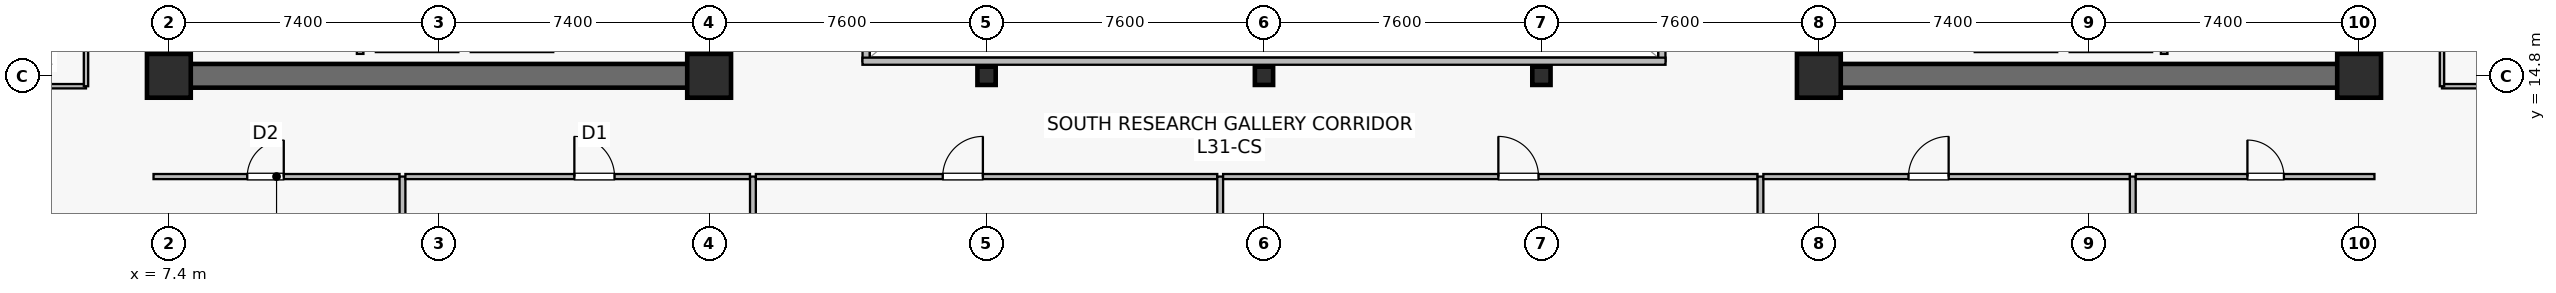
"""IFC4 building model, lengths in metres.
Left out: names, types, materials, properties, quantities, classifications, styles, units other than length and angle.
Written with IfcOpenShell. Run it as: python <this file> out.ifc"""

import sys

from ifc_helpers import new_model, si_unit, direction, frame, frame_2d, origin, origin_2d, place, context, subcontext, project, spatial, rectangle, hollow_rectangle, extrude, source, transform, mapped, element, fill, save


model = new_model("IFC4")
c1 = context("Model", 3, precision=1e-05, world=origin(), true_north=direction((0.0, 1.0)))
c2 = subcontext(c1, "Body", "Model", "MODEL_VIEW")
j1 = project(units=[si_unit("LENGTHUNIT", "METRE"), si_unit("PLANEANGLEUNIT", "RADIAN")], contexts=[c1])
p1 = place(None, origin())
s1 = spatial("IfcSite", under=j1, at=p1, CompositionType="ELEMENT")
p2 = place(p1, origin())
s2 = spatial("IfcBuilding", under=s1, at=p2, CompositionType="ELEMENT")
p3 = place(p2, frame((0.0, 0.0, 129.7)))
s3 = spatial("IfcBuildingStorey", under=s2, at=p3, CompositionType="ELEMENT", Elevation=129.7)
p4 = place(p3, frame((7.075, 14.8, 0.0), z_axis=(0.0, 0.0, 1.0), x_axis=(1.0, 0.0, 0.0)))
e1 = element("IfcWall", 1, at=p4, inside=s3, PredefinedType="SHEAR", context=c2, shape_type="SweptSolid", body=[
    extrude(rectangle(XDim=15.45, YDim=0.65, at=frame_2d((7.725, 0.0))), origin(), (0.0, 0.0, 1.0), 3.79),
])
p5 = place(p3, frame((7.4, 15.125, 0.0), z_axis=(0.0, 0.0, 1.0), x_axis=(0.0, 1.0, 0.0)))
e2 = element("IfcWall", 2, at=p5, inside=s3, PredefinedType="SHEAR", context=c2, shape_type="SweptSolid", body=[
    extrude(rectangle(XDim=18.35, YDim=0.65, at=frame_2d((9.175, 0.0))), origin(), (0.0, 0.0, 1.0), 3.79),
])
p6 = place(p3, frame((22.2, 15.125, 0.0), z_axis=(0.0, 0.0, 1.0), x_axis=(0.0, 1.0, 0.0)))
e3 = element("IfcWall", 3, at=p6, inside=s3, PredefinedType="SHEAR", context=c2, shape_type="SweptSolid", body=[
    extrude(rectangle(XDim=18.35, YDim=0.65, at=frame_2d((9.175, 0.0))), origin(), (0.0, 0.0, 1.0), 3.79),
])
p7 = place(p6, frame((3.425, 0.0, 0.0)))
e4 = element("IfcOpeningElement", 4, at=p7, cuts=e3, PredefinedType="OPENING", context=c2, shape_type="SweptSolid", body=[
    extrude(rectangle(XDim=1.42, YDim=2.2, at=frame_2d((0.71, 1.1))), frame((0.0, 0.335, 0.0), z_axis=(0.0, -1.0, 0.0), x_axis=(1.0, 0.0, 0.0)), (0.0, 0.0, 1.0), 0.67),
])
p8 = place(p3, frame((52.275, 14.8, 0.0), z_axis=(0.0, 0.0, 1.0), x_axis=(1.0, 0.0, 0.0)))
e5 = element("IfcWall", 5, at=p8, inside=s3, PredefinedType="SHEAR", context=c2, shape_type="SweptSolid", body=[
    extrude(rectangle(XDim=15.45, YDim=0.65, at=frame_2d((7.725, 0.0))), origin(), (0.0, 0.0, 1.0), 3.79),
])
p9 = place(p3, frame((52.6, 15.125, 0.0), z_axis=(0.0, 0.0, 1.0), x_axis=(0.0, 1.0, 0.0)))
e6 = element("IfcWall", 6, at=p9, inside=s3, PredefinedType="SHEAR", context=c2, shape_type="SweptSolid", body=[
    extrude(rectangle(XDim=18.35, YDim=0.65, at=frame_2d((9.175, 0.0))), origin(), (0.0, 0.0, 1.0), 3.79),
])
p10 = place(p9, frame((3.425, 0.0, 0.0)))
e7 = element("IfcOpeningElement", 7, at=p10, cuts=e6, PredefinedType="OPENING", context=c2, shape_type="SweptSolid", body=[
    extrude(rectangle(XDim=1.42, YDim=2.2, at=frame_2d((0.71, 1.1))), frame((0.0, 0.335, 0.0), z_axis=(0.0, -1.0, 0.0), x_axis=(1.0, 0.0, 0.0)), (0.0, 0.0, 1.0), 0.67),
])
p11 = place(p3, frame((67.4, 15.125, 0.0), z_axis=(0.0, 0.0, 1.0), x_axis=(0.0, 1.0, 0.0)))
e8 = element("IfcWall", 8, at=p11, inside=s3, PredefinedType="SHEAR", context=c2, shape_type="SweptSolid", body=[
    extrude(rectangle(XDim=18.35, YDim=0.65, at=frame_2d((9.175, 0.0))), origin(), (0.0, 0.0, 1.0), 3.79),
])
m1 = source(origin(), c2, "Body", "SweptSolid", [
    extrude(rectangle(XDim=1.2, YDim=1.2, at=origin_2d()), origin(), (0.0, 0.0, 1.0), 4.1),
])
for number, where, z_axis, x_axis in (
    (9, (7.4, 14.8, 0.0), (0.0, 0.0, 1.0), (1.0, 0.0, 0.0)),
    (10, (22.2, 14.8, 0.0), (0.0, 0.0, 1.0), (1.0, 0.0, 0.0)),
    (11, (52.6, 14.8, 0.0), (0.0, 0.0, 1.0), (1.0, 0.0, 0.0)),
    (12, (67.4, 14.8, 0.0), (0.0, 0.0, 1.0), (1.0, 0.0, 0.0)),
):
    element("IfcColumn", number, at=place(p3, frame(where, z_axis=z_axis, x_axis=x_axis)), inside=s3, PredefinedType="COLUMN", context=c2, shape_type="MappedRepresentation", body=[
        mapped(m1, transform((0.0, 0.0, 0.0), scale=1.0)),
    ])
m2 = source(origin(), c2, "Body", "SweptSolid", [
    extrude(hollow_rectangle(XDim=0.5, YDim=0.5, WallThickness=0.022, at=origin_2d()), origin(), (0.0, 0.0, 1.0), 4.1),
])
for number, where, z_axis, x_axis in (
    (13, (29.8, 14.8, 0.0), (0.0, 0.0, 1.0), (1.0, 0.0, 0.0)),
    (14, (37.4, 14.8, 0.0), (0.0, 0.0, 1.0), (1.0, 0.0, 0.0)),
    (15, (45.0, 14.8, 0.0), (0.0, 0.0, 1.0), (1.0, 0.0, 0.0)),
):
    element("IfcColumn", number, at=place(p3, frame(where, z_axis=z_axis, x_axis=x_axis)), inside=s3, PredefinedType="COLUMN", context=c2, shape_type="MappedRepresentation", body=[
        mapped(m2, transform((0.0, 0.0, 0.0), scale=1.0)),
    ])
p12 = place(p3, frame((13.07, 15.55, 0.0), z_axis=(0.0, 0.0, 1.0), x_axis=(1.0, 0.0, 0.0)))
e16 = element("IfcWall", 16, at=p12, inside=s3, PredefinedType="SOLIDWALL", context=c2, shape_type="SweptSolid", body=[
    extrude(rectangle(XDim=2.26, YDim=0.2, at=frame_2d((1.13, 0.0))), origin(), (0.0, 0.0, 1.0), 3.125),
])
p13 = place(p3, frame((15.67, 15.55, 0.0), z_axis=(0.0, 0.0, 1.0), x_axis=(1.0, 0.0, 0.0)))
e17 = element("IfcWall", 17, at=p13, inside=s3, PredefinedType="SOLIDWALL", context=c2, shape_type="SweptSolid", body=[
    extrude(rectangle(XDim=2.26, YDim=0.2, at=frame_2d((1.13, 0.0))), origin(), (0.0, 0.0, 1.0), 3.79),
])
p14 = place(p3, frame((12.64, 15.4, 0.0), z_axis=(0.0, 0.0, 1.0), x_axis=(0.0, 1.0, 0.0)))
e18 = element("IfcWall", 18, at=p14, inside=s3, PredefinedType="SOLIDWALL", context=c2, shape_type="SweptSolid", body=[
    extrude(rectangle(XDim=2.4, YDim=0.18, at=frame_2d((1.2, 0.0))), origin(), (0.0, 0.0, 1.0), 3.79),
])
p15 = place(p3, frame((59.47, 15.55, 0.0), z_axis=(0.0, 0.0, 1.0), x_axis=(1.0, 0.0, 0.0)))
e19 = element("IfcWall", 19, at=p15, inside=s3, PredefinedType="SOLIDWALL", context=c2, shape_type="SweptSolid", body=[
    extrude(rectangle(XDim=2.26, YDim=0.2, at=frame_2d((1.13, 0.0))), origin(), (0.0, 0.0, 1.0), 3.125),
])
p16 = place(p3, frame((56.87, 15.55, 0.0), z_axis=(0.0, 0.0, 1.0), x_axis=(1.0, 0.0, 0.0)))
e20 = element("IfcWall", 20, at=p16, inside=s3, PredefinedType="SOLIDWALL", context=c2, shape_type="SweptSolid", body=[
    extrude(rectangle(XDim=2.26, YDim=0.2, at=frame_2d((1.13, 0.0))), origin(), (0.0, 0.0, 1.0), 3.79),
])
p17 = place(p3, frame((62.06, 15.4, 0.0), z_axis=(0.0, 0.0, 1.0), x_axis=(0.0, 1.0, 0.0)))
e21 = element("IfcWall", 21, at=p17, inside=s3, PredefinedType="SOLIDWALL", context=c2, shape_type="SweptSolid", body=[
    extrude(rectangle(XDim=2.4, YDim=0.18, at=frame_2d((1.2, 0.0))), origin(), (0.0, 0.0, 1.0), 3.79),
])
p18 = place(p3, frame((26.5, 15.2, 0.0), z_axis=(0.0, 0.0, 1.0), x_axis=(0.0, 1.0, 0.0)))
e22 = element("IfcWall", 22, at=p18, inside=s3, PredefinedType="SOLIDWALL", context=c2, shape_type="SweptSolid", body=[
    extrude(rectangle(XDim=18.2, YDim=0.195, at=frame_2d((9.1, 0.0))), origin(), (0.0, 0.0, 1.0), 3.79),
])
p19 = place(p18, frame((1.8, 0.0, 0.9)))
e23 = element("IfcOpeningElement", 23, at=p19, cuts=e22, PredefinedType="OPENING", context=c2, shape_type="SweptSolid", body=[
    extrude(rectangle(XDim=1.2, YDim=1.35, at=frame_2d((0.6, 0.675))), frame((0.0, 0.107, 0.0), z_axis=(0.0, -1.0, 0.0), x_axis=(1.0, 0.0, 0.0)), (0.0, 0.0, 1.0), 0.215),
])
p20 = place(p18, frame((13.2, 0.0, 0.9)))
e24 = element("IfcOpeningElement", 24, at=p20, cuts=e22, PredefinedType="OPENING", context=c2, shape_type="SweptSolid", body=[
    extrude(rectangle(XDim=1.2, YDim=1.35, at=frame_2d((0.6, 0.675))), frame((0.0, 0.107, 0.0), z_axis=(0.0, -1.0, 0.0), x_axis=(1.0, 0.0, 0.0)), (0.0, 0.0, 1.0), 0.215),
])
p21 = place(p3, frame((48.3, 15.2, 0.0), z_axis=(0.0, 0.0, 1.0), x_axis=(0.0, 1.0, 0.0)))
e25 = element("IfcWall", 25, at=p21, inside=s3, PredefinedType="SOLIDWALL", context=c2, shape_type="SweptSolid", body=[
    extrude(rectangle(XDim=18.2, YDim=0.195, at=frame_2d((9.1, 0.0))), origin(), (0.0, 0.0, 1.0), 3.79),
])
p22 = place(p21, frame((1.8, 0.0, 0.9)))
e26 = element("IfcOpeningElement", 26, at=p22, cuts=e25, PredefinedType="OPENING", context=c2, shape_type="SweptSolid", body=[
    extrude(rectangle(XDim=1.2, YDim=1.35, at=frame_2d((0.6, 0.675))), frame((0.0, 0.107, 0.0), z_axis=(0.0, -1.0, 0.0), x_axis=(1.0, 0.0, 0.0)), (0.0, 0.0, 1.0), 0.215),
])
p23 = place(p21, frame((13.2, 0.0, 0.9)))
e27 = element("IfcOpeningElement", 27, at=p23, cuts=e25, PredefinedType="OPENING", context=c2, shape_type="SweptSolid", body=[
    extrude(rectangle(XDim=1.2, YDim=1.35, at=frame_2d((0.6, 0.675))), frame((0.0, 0.107, 0.0), z_axis=(0.0, -1.0, 0.0), x_axis=(1.0, 0.0, 0.0)), (0.0, 0.0, 1.0), 0.215),
])
p24 = place(p3, frame((26.4, 15.2, 0.0), z_axis=(0.0, 0.0, 1.0), x_axis=(1.0, 0.0, 0.0)))
e28 = element("IfcWall", 28, at=p24, inside=s3, PredefinedType="SOLIDWALL", context=c2, shape_type="SweptSolid", body=[
    extrude(rectangle(XDim=22.0, YDim=0.195, at=frame_2d((11.0, 0.0))), origin(), (0.0, 0.0, 1.0), 3.79),
])
p25 = place(p3, frame((6.98, 12.04, 0.0), z_axis=(0.0, 0.0, 1.0), x_axis=(1.0, 0.0, 0.0)))
e29 = element("IfcWall", 29, at=p25, inside=s3, PredefinedType="PARTITIONING", context=c2, shape_type="SweptSolid", body=[
    extrude(rectangle(XDim=6.74, YDim=0.14, at=frame_2d((3.37, 0.0))), origin(), (0.0, 0.0, 1.0), 3.275),
])
p26 = place(p25, frame((2.568, 0.0, 0.0)))
e30 = element("IfcOpeningElement", 30, at=p26, cuts=e29, PredefinedType="OPENING", context=c2, shape_type="SweptSolid", body=[
    extrude(rectangle(XDim=1.0, YDim=2.15, at=frame_2d((0.5, 1.075))), frame((0.0, 0.08, 0.0), z_axis=(0.0, -1.0, 0.0), x_axis=(1.0, 0.0, 0.0)), (0.0, 0.0, 1.0), 0.16),
])
p27 = place(p3, frame((13.8, 1.41, 0.0), z_axis=(0.0, 0.0, 1.0), x_axis=(0.0, 1.0, 0.0)))
e31 = element("IfcWall", 31, at=p27, inside=s3, PredefinedType="PARTITIONING", context=c2, shape_type="SweptSolid", body=[
    extrude(rectangle(XDim=10.63, YDim=0.16, at=frame_2d((5.315, 0.0))), origin(), (0.0, 0.0, 1.0), 3.075),
])
p28 = place(p3, frame((13.88, 12.04, 0.0), z_axis=(0.0, 0.0, 1.0), x_axis=(1.0, 0.0, 0.0)))
e32 = element("IfcWall", 32, at=p28, inside=s3, PredefinedType="PARTITIONING", context=c2, shape_type="SweptSolid", body=[
    extrude(rectangle(XDim=9.44, YDim=0.14, at=frame_2d((4.72, 0.0))), origin(), (0.0, 0.0, 1.0), 3.125),
])
p29 = place(p28, frame((4.628, 0.0, 0.0)))
e33 = element("IfcOpeningElement", 33, at=p29, cuts=e32, PredefinedType="OPENING", context=c2, shape_type="SweptSolid", body=[
    extrude(rectangle(XDim=1.1, YDim=2.18, at=frame_2d((0.55, 1.09))), frame((0.0, 0.08, 0.0), z_axis=(0.0, -1.0, 0.0), x_axis=(1.0, 0.0, 0.0)), (0.0, 0.0, 1.0), 0.16),
])
p30 = place(p3, frame((23.4, 1.41, 0.0), z_axis=(0.0, 0.0, 1.0), x_axis=(0.0, 1.0, 0.0)))
e34 = element("IfcWall", 34, at=p30, inside=s3, PredefinedType="PARTITIONING", context=c2, shape_type="SweptSolid", body=[
    extrude(rectangle(XDim=10.63, YDim=0.16, at=frame_2d((5.315, 0.0))), origin(), (0.0, 0.0, 1.0), 3.075),
])
p31 = place(p3, frame((23.48, 12.04, 0.0), z_axis=(0.0, 0.0, 1.0), x_axis=(1.0, 0.0, 0.0)))
e35 = element("IfcWall", 35, at=p31, inside=s3, PredefinedType="PARTITIONING", context=c2, shape_type="SweptSolid", body=[
    extrude(rectangle(XDim=12.64, YDim=0.14, at=frame_2d((6.32, 0.0))), origin(), (0.0, 0.0, 1.0), 3.125),
])
p32 = place(p31, frame((5.12, 0.0, 0.0)))
e36 = element("IfcOpeningElement", 36, at=p32, cuts=e35, PredefinedType="OPENING", context=c2, shape_type="SweptSolid", body=[
    extrude(rectangle(XDim=1.1, YDim=2.18, at=frame_2d((0.55, 1.09))), frame((0.0, 0.08, 0.0), z_axis=(0.0, -1.0, 0.0), x_axis=(1.0, 0.0, 0.0)), (0.0, 0.0, 1.0), 0.16),
])
p33 = place(p3, frame((36.2, 2.61, 0.0), z_axis=(0.0, 0.0, 1.0), x_axis=(0.0, 1.0, 0.0)))
e37 = element("IfcWall", 37, at=p33, inside=s3, PredefinedType="PARTITIONING", context=c2, shape_type="SweptSolid", body=[
    extrude(rectangle(XDim=9.43, YDim=0.16, at=frame_2d((4.715, 0.0))), origin(), (0.0, 0.0, 1.0), 3.075),
])
p34 = place(p3, frame((36.28, 12.04, 0.0), z_axis=(0.0, 0.0, 1.0), x_axis=(1.0, 0.0, 0.0)))
e38 = element("IfcWall", 38, at=p34, inside=s3, PredefinedType="PARTITIONING", context=c2, shape_type="SweptSolid", body=[
    extrude(rectangle(XDim=14.64, YDim=0.14, at=frame_2d((7.32, 0.0))), origin(), (0.0, 0.0, 1.0), 3.125),
])
p35 = place(p34, frame((7.54, 0.0, 0.0)))
e39 = element("IfcOpeningElement", 39, at=p35, cuts=e38, PredefinedType="OPENING", context=c2, shape_type="SweptSolid", body=[
    extrude(rectangle(XDim=1.1, YDim=2.18, at=frame_2d((0.55, 1.09))), frame((0.0, 0.08, 0.0), z_axis=(0.0, -1.0, 0.0), x_axis=(1.0, 0.0, 0.0)), (0.0, 0.0, 1.0), 0.16),
])
p36 = place(p3, frame((51.0, 1.41, 0.0), z_axis=(0.0, 0.0, 1.0), x_axis=(0.0, 1.0, 0.0)))
e40 = element("IfcWall", 40, at=p36, inside=s3, PredefinedType="PARTITIONING", context=c2, shape_type="SweptSolid", body=[
    extrude(rectangle(XDim=10.63, YDim=0.16, at=frame_2d((5.315, 0.0))), origin(), (0.0, 0.0, 1.0), 3.075),
])
p37 = place(p3, frame((51.08, 12.04, 0.0), z_axis=(0.0, 0.0, 1.0), x_axis=(1.0, 0.0, 0.0)))
e41 = element("IfcWall", 41, at=p37, inside=s3, PredefinedType="PARTITIONING", context=c2, shape_type="SweptSolid", body=[
    extrude(rectangle(XDim=10.04, YDim=0.14, at=frame_2d((5.02, 0.0))), origin(), (0.0, 0.0, 1.0), 3.125),
])
p38 = place(p37, frame((3.976, 0.0, 0.0)))
e42 = element("IfcOpeningElement", 42, at=p38, cuts=e41, PredefinedType="OPENING", context=c2, shape_type="SweptSolid", body=[
    extrude(rectangle(XDim=1.1, YDim=2.18, at=frame_2d((0.55, 1.09))), frame((0.0, 0.08, 0.0), z_axis=(0.0, -1.0, 0.0), x_axis=(1.0, 0.0, 0.0)), (0.0, 0.0, 1.0), 0.16),
])
p39 = place(p3, frame((61.2, 1.41, 0.0), z_axis=(0.0, 0.0, 1.0), x_axis=(0.0, 1.0, 0.0)))
e43 = element("IfcWall", 43, at=p39, inside=s3, PredefinedType="PARTITIONING", context=c2, shape_type="SweptSolid", body=[
    extrude(rectangle(XDim=10.63, YDim=0.16, at=frame_2d((5.315, 0.0))), origin(), (0.0, 0.0, 1.0), 3.075),
])
p40 = place(p3, frame((61.28, 12.04, 0.0), z_axis=(0.0, 0.0, 1.0), x_axis=(1.0, 0.0, 0.0)))
e44 = element("IfcWall", 44, at=p40, inside=s3, PredefinedType="PARTITIONING", context=c2, shape_type="SweptSolid", body=[
    extrude(rectangle(XDim=6.54, YDim=0.14, at=frame_2d((3.27, 0.0))), origin(), (0.0, 0.0, 1.0), 3.275),
])
p41 = place(p40, frame((3.06, 0.0, 0.0)))
e45 = element("IfcOpeningElement", 45, at=p41, cuts=e44, PredefinedType="OPENING", context=c2, shape_type="SweptSolid", body=[
    extrude(rectangle(XDim=1.0, YDim=2.15, at=frame_2d((0.5, 1.075))), frame((0.0, 0.08, 0.0), z_axis=(0.0, -1.0, 0.0), x_axis=(1.0, 0.0, 0.0)), (0.0, 0.0, 1.0), 0.16),
])
p42 = place(p3, frame((2.11, 14.515, 0.0), z_axis=(0.0, 0.0, 1.0), x_axis=(1.0, 0.0, 0.0)))
e46 = element("IfcWall", 46, at=p42, inside=s3, PredefinedType="PARTITIONING", context=c2, shape_type="SweptSolid", body=[
    extrude(rectangle(XDim=3.02, YDim=0.12, at=frame_2d((1.51, 0.0))), origin(), (0.0, 0.0, 1.0), 3.79),
])
p43 = place(p3, frame((5.13, 14.515, 0.0), z_axis=(0.0, 0.0, 1.0), x_axis=(0.0, 1.0, 0.0)))
e47 = element("IfcWall", 47, at=p43, inside=s3, PredefinedType="PARTITIONING", context=c2, shape_type="SweptSolid", body=[
    extrude(rectangle(XDim=7.425, YDim=0.12, at=frame_2d((3.712, 0.0))), origin(), (0.0, 0.0, 1.0), 3.79),
])
p44 = place(p43, frame((3.262, 0.0, 0.0)))
e48 = element("IfcOpeningElement", 48, at=p44, cuts=e47, PredefinedType="OPENING", context=c2, shape_type="SweptSolid", body=[
    extrude(rectangle(XDim=0.9, YDim=2.1, at=frame_2d((0.45, 1.05))), frame((0.0, 0.07, 0.0), z_axis=(0.0, -1.0, 0.0), x_axis=(1.0, 0.0, 0.0)), (0.0, 0.0, 1.0), 0.14),
])
p45 = place(p3, frame((69.67, 14.515, 0.0), z_axis=(0.0, 0.0, 1.0), x_axis=(1.0, 0.0, 0.0)))
e49 = element("IfcWall", 49, at=p45, inside=s3, PredefinedType="PARTITIONING", context=c2, shape_type="SweptSolid", body=[
    extrude(rectangle(XDim=3.02, YDim=0.12, at=frame_2d((1.51, 0.0))), origin(), (0.0, 0.0, 1.0), 3.79),
])
p46 = place(p3, frame((69.67, 14.515, 0.0), z_axis=(0.0, 0.0, 1.0), x_axis=(0.0, 1.0, 0.0)))
e50 = element("IfcWall", 50, at=p46, inside=s3, PredefinedType="PARTITIONING", context=c2, shape_type="SweptSolid", body=[
    extrude(rectangle(XDim=19.57, YDim=0.12, at=frame_2d((9.785, 0.0))), origin(), (0.0, 0.0, 1.0), 3.79),
])
p47 = place(p46, frame((9.335, 0.0, 0.0)))
e51 = element("IfcOpeningElement", 51, at=p47, cuts=e50, PredefinedType="OPENING", context=c2, shape_type="SweptSolid", body=[
    extrude(rectangle(XDim=0.9, YDim=2.1, at=frame_2d((0.45, 1.05))), frame((0.0, 0.07, 0.0), z_axis=(0.0, -1.0, 0.0), x_axis=(1.0, 0.0, 0.0)), (0.0, 0.0, 1.0), 0.14),
])
m3 = source(origin(), c2, "Body", "SweptSolid", [
    extrude(rectangle(XDim=1.0, YDim=2.15, at=frame_2d((0.5, 1.075))), frame((0.0, 0.025, 0.0), z_axis=(0.0, -1.0, 0.0), x_axis=(1.0, 0.0, 0.0)), (0.0, 0.0, 1.0), 0.05),
])
p48 = place(p26, origin())
e52 = element("IfcDoor", 52, at=p48, inside=s3, OperationType="SINGLE_SWING_RIGHT", PredefinedType="DOOR", context=c2, shape_type="MappedRepresentation", body=[
    mapped(m3, transform((0.0, 0.0, 0.0), scale=1.0)),
])
fill(e30, e52)
m4 = source(origin(), c2, "Body", "SweptSolid", [
    extrude(rectangle(XDim=1.1, YDim=2.18, at=frame_2d((0.55, 1.09))), frame((0.0, 0.025, 0.0), z_axis=(0.0, -1.0, 0.0), x_axis=(1.0, 0.0, 0.0)), (0.0, 0.0, 1.0), 0.05),
])
p49 = place(p29, origin())
e53 = element("IfcDoor", 53, at=p49, inside=s3, OperationType="SINGLE_SWING_LEFT", PredefinedType="DOOR", context=c2, shape_type="MappedRepresentation", body=[
    mapped(m4, transform((0.0, 0.0, 0.0), scale=1.0)),
])
fill(e33, e53)
p50 = place(p32, origin())
e54 = element("IfcDoor", 54, at=p50, inside=s3, OperationType="SINGLE_SWING_RIGHT", PredefinedType="DOOR", context=c2, shape_type="MappedRepresentation", body=[
    mapped(m4, transform((0.0, 0.0, 0.0), scale=1.0)),
])
fill(e36, e54)
p51 = place(p35, origin())
e55 = element("IfcDoor", 55, at=p51, inside=s3, OperationType="SINGLE_SWING_LEFT", PredefinedType="DOOR", context=c2, shape_type="MappedRepresentation", body=[
    mapped(m4, transform((0.0, 0.0, 0.0), scale=1.0)),
])
fill(e39, e55)
p52 = place(p38, origin())
e56 = element("IfcDoor", 56, at=p52, inside=s3, OperationType="SINGLE_SWING_RIGHT", PredefinedType="DOOR", context=c2, shape_type="MappedRepresentation", body=[
    mapped(m4, transform((0.0, 0.0, 0.0), scale=1.0)),
])
fill(e42, e56)
p53 = place(p41, origin())
e57 = element("IfcDoor", 57, at=p53, inside=s3, OperationType="SINGLE_SWING_LEFT", PredefinedType="DOOR", context=c2, shape_type="MappedRepresentation", body=[
    mapped(m3, transform((0.0, 0.0, 0.0), scale=1.0)),
])
fill(e45, e57)
save(model, sys.argv[1])
